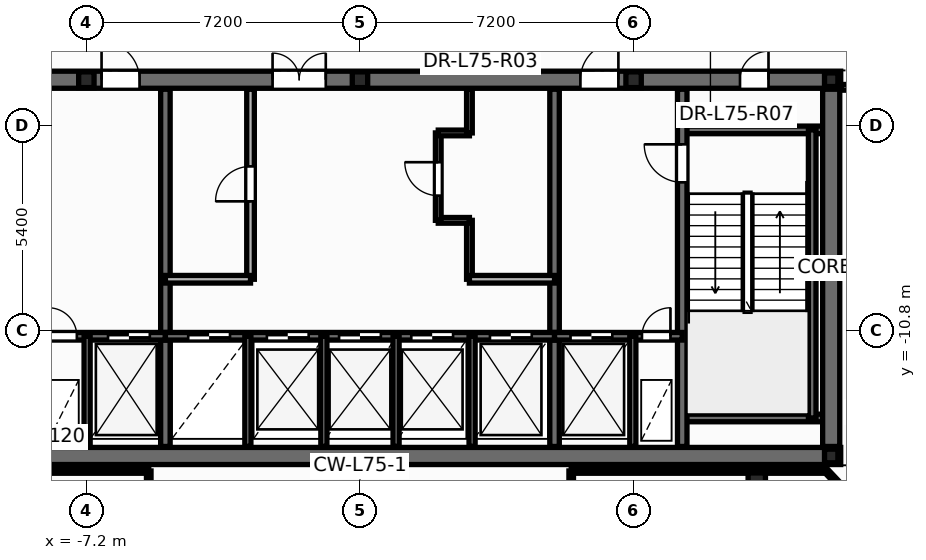
"""IFC4 building model, lengths in metres.
Left out: names, types, materials, properties, quantities, classifications, styles, units other than length and angle.
Written with IfcOpenShell. Run it as: python <this file> out.ifc"""

import sys

from ifc_helpers import new_model, si_unit, direction, frame, frame_2d, origin, origin_2d, place, context, subcontext, project, spatial, rectangle, hollow_circle, i_section, extrude, element, fill, save


model = new_model("IFC4")
c1 = context("Model", 3, precision=1e-05, world=origin(), true_north=direction((0.0, 1.0)))
c2 = subcontext(c1, "Body", "Model", "MODEL_VIEW")
j1 = project(units=[si_unit("LENGTHUNIT", "METRE"), si_unit("PLANEANGLEUNIT", "RADIAN")], contexts=[c1])
p1 = place(None, origin())
s1 = spatial("IfcSite", under=j1, at=p1, CompositionType="ELEMENT")
p2 = place(p1, origin())
s2 = spatial("IfcBuilding", under=s1, at=p2, CompositionType="ELEMENT")
p3 = place(p2, frame((0.0, 0.0, 285.0)))
s3 = spatial("IfcBuildingStorey", under=s2, at=p3, CompositionType="ELEMENT", Elevation=285.0)
p4 = place(p3, frame((10.442, -14.774, 0.0), z_axis=(0.0, 0.0, 1.0), x_axis=(1.0, 0.0, 0.0)))
e1 = element("IfcColumn", 1, at=p4, inside=s3, PredefinedType="COLUMN", context=c2, shape_type="SweptSolid", body=[
    extrude(hollow_circle(Radius=0.229, WallThickness=0.016, at=origin_2d()), origin(), (0.0, 0.0, 1.0), 4.2),
])
for number, where, z_axis, x_axis in (
    (2, (12.4, -14.1, 0.0), (0.0, 0.0, 1.0), (1.0, 0.0, 0.0)),
    (3, (12.4, -4.2, 0.0), (0.0, 0.0, 1.0), (1.0, 0.0, 0.0)),
):
    element("IfcColumn", number, at=place(p3, frame(where, z_axis=z_axis, x_axis=x_axis)), inside=s3, PredefinedType="COLUMN", context=c2, shape_type="SweptSolid", body=[
        extrude(i_section(OverallWidth=0.352, OverallDepth=0.359, WebThickness=0.018, FlangeThickness=0.026, at=origin_2d()), origin(), (0.0, 0.0, 1.0), 4.2),
    ])
for number, where, z_axis, x_axis in (
    (4, (-7.2, -4.2, 0.0), (0.0, 0.0, 1.0), (1.0, 0.0, 0.0)),
    (5, (0.0, -4.2, 0.0), (0.0, 0.0, 1.0), (1.0, 0.0, 0.0)),
    (6, (7.2, -4.2, 0.0), (0.0, 0.0, 1.0), (1.0, 0.0, 0.0)),
):
    element("IfcColumn", number, at=place(p3, frame(where, z_axis=z_axis, x_axis=x_axis)), inside=s3, PredefinedType="PILASTER", context=c2, shape_type="SweptSolid", body=[
        extrude(i_section(OverallWidth=0.405, OverallDepth=0.414, WebThickness=0.022, FlangeThickness=0.032, at=origin_2d()), origin(), (0.0, 0.0, 1.0), 4.2),
    ])
p5 = place(p3, frame((2.88, -9.45, 0.0), z_axis=(0.0, 0.0, 1.0), x_axis=(0.0, 1.0, 0.0)))
e7 = element("IfcWall", 7, at=p5, inside=s3, PredefinedType="PARTITIONING", context=c2, shape_type="SweptSolid", body=[
    extrude(rectangle(XDim=1.55, YDim=0.15, at=frame_2d((0.775, 0.0))), origin(), (0.0, 0.0, 1.0), 3.92),
])
p6 = place(p3, frame((2.06, -7.9, 0.0), z_axis=(0.0, 0.0, 1.0), x_axis=(1.0, 0.0, 0.0)))
e8 = element("IfcWall", 8, at=p6, inside=s3, PredefinedType="PARTITIONING", context=c2, shape_type="SweptSolid", body=[
    extrude(rectangle(XDim=0.82, YDim=0.15, at=frame_2d((0.41, 0.0))), origin(), (0.0, 0.0, 1.0), 3.92),
])
p7 = place(p3, frame((2.06, -7.9, 0.0), z_axis=(0.0, 0.0, 1.0), x_axis=(0.0, 1.0, 0.0)))
e9 = element("IfcWall", 9, at=p7, inside=s3, PredefinedType="PARTITIONING", context=c2, shape_type="SweptSolid", body=[
    extrude(rectangle(XDim=2.3, YDim=0.15, at=frame_2d((1.15, 0.0))), origin(), (0.0, 0.0, 1.0), 3.92),
])
p8 = place(p7, frame((0.65, 0.0, 0.0)))
e10 = element("IfcOpeningElement", 10, at=p8, cuts=e9, PredefinedType="OPENING", context=c2, shape_type="SweptSolid", body=[
    extrude(rectangle(XDim=0.886, YDim=2.104, at=frame_2d((0.44, 1.052))), frame((0.0, 0.085, 0.0), z_axis=(0.0, -1.0, 0.0), x_axis=(1.0, 0.0, 0.0)), (0.0, 0.0, 1.0), 0.17),
])
p9 = place(p3, frame((2.06, -5.6, 0.0), z_axis=(0.0, 0.0, 1.0), x_axis=(1.0, 0.0, 0.0)))
e11 = element("IfcWall", 11, at=p9, inside=s3, PredefinedType="PARTITIONING", context=c2, shape_type="SweptSolid", body=[
    extrude(rectangle(XDim=0.82, YDim=0.15, at=frame_2d((0.41, 0.0))), origin(), (0.0, 0.0, 1.0), 3.92),
])
p10 = place(p3, frame((2.88, -5.6, 0.0), z_axis=(0.0, 0.0, 1.0), x_axis=(0.0, 1.0, 0.0)))
e12 = element("IfcWall", 12, at=p10, inside=s3, PredefinedType="PARTITIONING", context=c2, shape_type="SweptSolid", body=[
    extrude(rectangle(XDim=1.15, YDim=0.15, at=frame_2d((0.575, 0.0))), origin(), (0.0, 0.0, 1.0), 3.92),
])
p11 = place(p3, frame((-12.65, -14.1, 0.0), z_axis=(0.0, 0.0, 1.0), x_axis=(1.0, 0.0, 0.0)))
e13 = element("IfcWall", 13, at=p11, inside=s3, PredefinedType="SHEAR", context=c2, shape_type="SweptSolid", body=[
    extrude(rectangle(XDim=25.3, YDim=0.45, at=frame_2d((12.65, 0.0))), origin(), (0.0, 0.0, 1.0), 4.2),
])
p12 = place(p3, frame((-12.65, -4.2, 0.0), z_axis=(0.0, 0.0, 1.0), x_axis=(1.0, 0.0, 0.0)))
e14 = element("IfcWall", 14, at=p12, inside=s3, PredefinedType="SHEAR", context=c2, shape_type="SweptSolid", body=[
    extrude(rectangle(XDim=25.3, YDim=0.45, at=frame_2d((12.65, 0.0))), origin(), (0.0, 0.0, 1.0), 4.2),
])
p13 = place(p12, frame((1.85, 0.0, 0.0)))
e15 = element("IfcOpeningElement", 15, at=p13, cuts=e14, PredefinedType="OPENING", context=c2, shape_type="SweptSolid", body=[
    extrude(rectangle(XDim=0.756, YDim=2.054, at=frame_2d((0.375, 1.027))), frame((0.0, 0.235, 0.0), z_axis=(0.0, -1.0, 0.0), x_axis=(1.0, 0.0, 0.0)), (0.0, 0.0, 1.0), 0.47),
])
p14 = place(p12, frame((22.65, 0.0, 0.0)))
e16 = element("IfcOpeningElement", 16, at=p14, cuts=e14, PredefinedType="OPENING", context=c2, shape_type="SweptSolid", body=[
    extrude(rectangle(XDim=0.756, YDim=2.054, at=frame_2d((0.375, 1.027))), frame((0.0, 0.235, 0.0), z_axis=(0.0, -1.0, 0.0), x_axis=(1.0, 0.0, 0.0)), (0.0, 0.0, 1.0), 0.47),
])
p15 = place(p12, frame((5.85, 0.0, 0.0)))
e17 = element("IfcOpeningElement", 17, at=p15, cuts=e14, PredefinedType="OPENING", context=c2, shape_type="SweptSolid", body=[
    extrude(rectangle(XDim=1.006, YDim=2.104, at=frame_2d((0.5, 1.052))), frame((0.0, 0.235, 0.0), z_axis=(0.0, -1.0, 0.0), x_axis=(1.0, 0.0, 0.0)), (0.0, 0.0, 1.0), 0.47),
])
p16 = place(p12, frame((10.35, 0.0, 0.0)))
e18 = element("IfcOpeningElement", 18, at=p16, cuts=e14, PredefinedType="OPENING", context=c2, shape_type="SweptSolid", body=[
    extrude(rectangle(XDim=1.406, YDim=2.154, at=frame_2d((0.7, 1.077))), frame((0.0, 0.235, 0.0), z_axis=(0.0, -1.0, 0.0), x_axis=(1.0, 0.0, 0.0)), (0.0, 0.0, 1.0), 0.47),
])
p17 = place(p12, frame((18.45, 0.0, 0.0)))
e19 = element("IfcOpeningElement", 19, at=p17, cuts=e14, PredefinedType="OPENING", context=c2, shape_type="SweptSolid", body=[
    extrude(rectangle(XDim=1.006, YDim=2.104, at=frame_2d((0.5, 1.052))), frame((0.0, 0.235, 0.0), z_axis=(0.0, -1.0, 0.0), x_axis=(1.0, 0.0, 0.0)), (0.0, 0.0, 1.0), 0.47),
])
for number, where, z_axis, x_axis in (
    (20, (8.48, -5.52, 0.0), (0.0, 0.0, 1.0), (1.0, 0.0, 0.0)),
    (21, (8.48, -13.1, 0.0), (0.0, 0.0, 1.0), (1.0, 0.0, 0.0)),
):
    element("IfcWall", number, at=place(p3, frame(where, z_axis=z_axis, x_axis=x_axis)), inside=s3, PredefinedType="SOLIDWALL", context=c2, shape_type="SweptSolid", body=[
        extrude(rectangle(XDim=3.87, YDim=0.2, at=frame_2d((1.935, 0.0))), origin(), (0.0, 0.0, 1.0), 4.2),
    ])
p18 = place(p3, frame((11.9, -13.1, 0.0), z_axis=(0.0, 0.0, 1.0), x_axis=(0.0, 1.0, 0.0)))
e22 = element("IfcWall", 22, at=p18, inside=s3, PredefinedType="SOLIDWALL", context=c2, shape_type="SweptSolid", body=[
    extrude(rectangle(XDim=7.58, YDim=0.2, at=frame_2d((3.79, 0.0))), origin(), (0.0, 0.0, 1.0), 4.2),
])
p19 = place(p3, frame((8.48, -13.85, 0.0), z_axis=(0.0, 0.0, 1.0), x_axis=(0.0, 1.0, 0.0)))
e23 = element("IfcWall", 23, at=p19, inside=s3, PredefinedType="SHEAR", context=c2, shape_type="SweptSolid", body=[
    extrude(rectangle(XDim=9.4, YDim=0.25, at=frame_2d((4.7, 0.0))), origin(), (0.0, 0.0, 1.0), 4.2),
])
p20 = place(p19, frame((6.95, 0.0, 0.0)))
e24 = element("IfcOpeningElement", 24, at=p20, cuts=e23, PredefinedType="OPENING", context=c2, shape_type="SweptSolid", body=[
    extrude(rectangle(XDim=1.006, YDim=2.104, at=frame_2d((0.5, 1.052))), frame((0.0, 0.135, 0.0), z_axis=(0.0, -1.0, 0.0), x_axis=(1.0, 0.0, 0.0)), (0.0, 0.0, 1.0), 0.27),
])
for number, where, z_axis, x_axis in (
    (25, (-5.12, -13.85, 0.0), (0.0, 0.0, 1.0), (0.0, 1.0, 0.0)),
    (26, (5.12, -13.85, 0.0), (0.0, 0.0, 1.0), (0.0, 1.0, 0.0)),
):
    element("IfcWall", number, at=place(p3, frame(where, z_axis=z_axis, x_axis=x_axis)), inside=s3, PredefinedType="SHEAR", context=c2, shape_type="SweptSolid", body=[
        extrude(rectangle(XDim=9.4, YDim=0.25, at=frame_2d((4.7, 0.0))), origin(), (0.0, 0.0, 1.0), 4.2),
    ])
p21 = place(p3, frame((-8.48, -10.95, 0.0), z_axis=(0.0, 0.0, 1.0), x_axis=(1.0, 0.0, 0.0)))
e27 = element("IfcWall", 27, at=p21, inside=s3, PredefinedType="SOLIDWALL", context=c2, shape_type="SweptSolid", body=[
    extrude(rectangle(XDim=3.36, YDim=0.2, at=frame_2d((1.68, 0.0))), origin(), (0.0, 0.0, 1.0), 4.2),
])
p22 = place(p21, frame((0.28, 0.0, 0.0)))
e28 = element("IfcOpeningElement", 28, at=p22, cuts=e27, PredefinedType="OPENING", context=c2, shape_type="SweptSolid", body=[
    extrude(rectangle(XDim=0.756, YDim=2.054, at=frame_2d((0.375, 1.027))), frame((0.0, 0.11, 0.0), z_axis=(0.0, -1.0, 0.0), x_axis=(1.0, 0.0, 0.0)), (0.0, 0.0, 1.0), 0.22),
])
p23 = place(p21, frame((1.85, 0.0, 0.0)))
e29 = element("IfcOpeningElement", 29, at=p23, cuts=e27, PredefinedType="OPENING", context=c2, shape_type="SweptSolid", body=[
    extrude(rectangle(XDim=1.106, YDim=2.104, at=frame_2d((0.55, 1.052))), frame((0.0, 0.11, 0.0), z_axis=(0.0, -1.0, 0.0), x_axis=(1.0, 0.0, 0.0)), (0.0, 0.0, 1.0), 0.22),
])
p24 = place(p3, frame((-5.12, -10.95, 0.0), z_axis=(0.0, 0.0, 1.0), x_axis=(1.0, 0.0, 0.0)))
e30 = element("IfcWall", 30, at=p24, inside=s3, PredefinedType="SOLIDWALL", context=c2, shape_type="SweptSolid", body=[
    extrude(rectangle(XDim=10.24, YDim=0.2, at=frame_2d((5.12, 0.0))), origin(), (0.0, 0.0, 1.0), 4.2),
])
p25 = place(p24, frame((0.6, 0.0, 0.0)))
e31 = element("IfcOpeningElement", 31, at=p25, cuts=e30, PredefinedType="OPENING", context=c2, shape_type="SweptSolid", body=[
    extrude(rectangle(XDim=1.106, YDim=2.104, at=frame_2d((0.55, 1.052))), frame((0.0, 0.11, 0.0), z_axis=(0.0, -1.0, 0.0), x_axis=(1.0, 0.0, 0.0)), (0.0, 0.0, 1.0), 0.22),
])
p26 = place(p24, frame((2.67, 0.0, 0.0)))
e32 = element("IfcOpeningElement", 32, at=p26, cuts=e30, PredefinedType="OPENING", context=c2, shape_type="SweptSolid", body=[
    extrude(rectangle(XDim=1.106, YDim=2.104, at=frame_2d((0.55, 1.052))), frame((0.0, 0.11, 0.0), z_axis=(0.0, -1.0, 0.0), x_axis=(1.0, 0.0, 0.0)), (0.0, 0.0, 1.0), 0.22),
])
p27 = place(p24, frame((4.57, 0.0, 0.0)))
e33 = element("IfcOpeningElement", 33, at=p27, cuts=e30, PredefinedType="OPENING", context=c2, shape_type="SweptSolid", body=[
    extrude(rectangle(XDim=1.106, YDim=2.104, at=frame_2d((0.55, 1.052))), frame((0.0, 0.11, 0.0), z_axis=(0.0, -1.0, 0.0), x_axis=(1.0, 0.0, 0.0)), (0.0, 0.0, 1.0), 0.22),
])
p28 = place(p24, frame((6.47, 0.0, 0.0)))
e34 = element("IfcOpeningElement", 34, at=p28, cuts=e30, PredefinedType="OPENING", context=c2, shape_type="SweptSolid", body=[
    extrude(rectangle(XDim=1.106, YDim=2.104, at=frame_2d((0.55, 1.052))), frame((0.0, 0.11, 0.0), z_axis=(0.0, -1.0, 0.0), x_axis=(1.0, 0.0, 0.0)), (0.0, 0.0, 1.0), 0.22),
])
p29 = place(p24, frame((8.54, 0.0, 0.0)))
e35 = element("IfcOpeningElement", 35, at=p29, cuts=e30, PredefinedType="OPENING", context=c2, shape_type="SweptSolid", body=[
    extrude(rectangle(XDim=1.106, YDim=2.104, at=frame_2d((0.55, 1.052))), frame((0.0, 0.11, 0.0), z_axis=(0.0, -1.0, 0.0), x_axis=(1.0, 0.0, 0.0)), (0.0, 0.0, 1.0), 0.22),
])
p30 = place(p3, frame((5.12, -10.95, 0.0), z_axis=(0.0, 0.0, 1.0), x_axis=(1.0, 0.0, 0.0)))
e36 = element("IfcWall", 36, at=p30, inside=s3, PredefinedType="SOLIDWALL", context=c2, shape_type="SweptSolid", body=[
    extrude(rectangle(XDim=3.36, YDim=0.2, at=frame_2d((1.68, 0.0))), origin(), (0.0, 0.0, 1.0), 4.2),
])
p31 = place(p30, frame((0.42, 0.0, 0.0)))
e37 = element("IfcOpeningElement", 37, at=p31, cuts=e36, PredefinedType="OPENING", context=c2, shape_type="SweptSolid", body=[
    extrude(rectangle(XDim=1.106, YDim=2.104, at=frame_2d((0.55, 1.052))), frame((0.0, 0.11, 0.0), z_axis=(0.0, -1.0, 0.0), x_axis=(1.0, 0.0, 0.0)), (0.0, 0.0, 1.0), 0.22),
])
p32 = place(p30, frame((2.3, 0.0, 0.0)))
e38 = element("IfcOpeningElement", 38, at=p32, cuts=e36, PredefinedType="OPENING", context=c2, shape_type="SweptSolid", body=[
    extrude(rectangle(XDim=0.756, YDim=2.054, at=frame_2d((0.375, 1.027))), frame((0.0, 0.11, 0.0), z_axis=(0.0, -1.0, 0.0), x_axis=(1.0, 0.0, 0.0)), (0.0, 0.0, 1.0), 0.22),
])
for number, where, z_axis, x_axis in (
    (39, (-7.18, -13.85, 0.0), (0.0, 0.0, 1.0), (0.0, 1.0, 0.0)),
    (40, (7.18, -13.85, 0.0), (0.0, 0.0, 1.0), (0.0, 1.0, 0.0)),
    (41, (-2.95, -13.85, 0.0), (0.0, 0.0, 1.0), (0.0, 1.0, 0.0)),
    (42, (2.95, -13.85, 0.0), (0.0, 0.0, 1.0), (0.0, 1.0, 0.0)),
):
    element("IfcWall", number, at=place(p3, frame(where, z_axis=z_axis, x_axis=x_axis)), inside=s3, PredefinedType="PARTITIONING", context=c2, shape_type="SweptSolid", body=[
        extrude(rectangle(XDim=2.9, YDim=0.16, at=frame_2d((1.45, 0.0))), origin(), (0.0, 0.0, 1.0), 3.145),
    ])
p33 = place(p3, frame((12.4, -13.85, 0.0), z_axis=(0.0, 0.0, 1.0), x_axis=(0.0, 1.0, 0.0)))
e43 = element("IfcWall", 43, at=p33, inside=s3, PredefinedType="SHEAR", context=c2, shape_type="SweptSolid", body=[
    extrude(rectangle(XDim=9.4, YDim=0.45, at=frame_2d((4.7, 0.0))), origin(), (0.0, 0.0, 1.0), 4.2),
])
p34 = place(p3, frame((-2.88, -9.45, 0.0), z_axis=(0.0, 0.0, 1.0), x_axis=(0.0, 1.0, 0.0)))
e44 = element("IfcWall", 44, at=p34, inside=s3, PredefinedType="SOLIDWALL", context=c2, shape_type="SweptSolid", body=[
    extrude(rectangle(XDim=5.0, YDim=0.2, at=frame_2d((2.5, 0.0))), origin(), (0.0, 0.0, 1.0), 3.92),
])
p35 = place(p34, frame((2.05, 0.0, 0.0)))
e45 = element("IfcOpeningElement", 45, at=p35, cuts=e44, PredefinedType="OPENING", context=c2, shape_type="SweptSolid", body=[
    extrude(rectangle(XDim=0.926, YDim=2.104, at=frame_2d((0.46, 1.052))), frame((0.0, 0.11, 0.0), z_axis=(0.0, -1.0, 0.0), x_axis=(1.0, 0.0, 0.0)), (0.0, 0.0, 1.0), 0.22),
])
for number, where, z_axis, x_axis in (
    (46, (-5.12, -9.45, 0.0), (0.0, 0.0, 1.0), (1.0, 0.0, 0.0)),
    (47, (2.88, -9.45, 0.0), (0.0, 0.0, 1.0), (1.0, 0.0, 0.0)),
):
    element("IfcWall", number, at=place(p3, frame(where, z_axis=z_axis, x_axis=x_axis)), inside=s3, PredefinedType="SOLIDWALL", context=c2, shape_type="SweptSolid", body=[
        extrude(rectangle(XDim=2.24, YDim=0.2, at=frame_2d((1.12, 0.0))), origin(), (0.0, 0.0, 1.0), 3.92),
    ])
for number, where, z_axis, x_axis in (
    (48, (-0.95, -13.85, 0.0), (0.0, 0.0, 1.0), (0.0, 1.0, 0.0)),
    (49, (0.95, -13.85, 0.0), (0.0, 0.0, 1.0), (0.0, 1.0, 0.0)),
):
    element("IfcWall", number, at=place(p3, frame(where, z_axis=z_axis, x_axis=x_axis)), inside=s3, PredefinedType="PARTITIONING", context=c2, shape_type="SweptSolid", body=[
        extrude(rectangle(XDim=2.9, YDim=0.16, at=frame_2d((1.45, 0.0))), origin(), (0.0, 0.0, 1.0), 3.145),
    ])
for number, where, z_axis, x_axis in (
    (50, (-12.27, -14.494, 0.0), (0.0, 0.0, 1.0), (1.0, 0.0, 0.0)),
    (51, (5.558, -14.494, 0.0), (0.0, 0.0, 1.0), (1.0, 0.0, 0.0)),
):
    element("IfcWall", number, at=place(p3, frame(where, z_axis=z_axis, x_axis=x_axis)), inside=s3, PredefinedType="PARTITIONING", context=c2, shape_type="SweptSolid", body=[
        extrude(rectangle(XDim=6.711, YDim=0.12, at=frame_2d((3.356, 0.0))), origin(), (0.0, 0.0, 1.0), 3.438),
    ])
p36 = place(p3, frame((12.652, -4.4, 0.0), z_axis=(0.0, 0.0, 1.0), x_axis=(1.0, 0.0, 0.0)))
e52 = element("IfcWall", 52, at=p36, inside=s3, PredefinedType="PARTITIONING", context=c2, shape_type="SweptSolid", body=[
    extrude(rectangle(XDim=2.602, YDim=0.15, at=frame_2d((1.301, 0.0))), origin(), (0.0, 0.0, 1.0), 2.895),
])
p37 = place(p36, frame((1.528, 0.0, 0.0)))
e53 = element("IfcOpeningElement", 53, at=p37, cuts=e52, PredefinedType="OPENING", context=c2, shape_type="SweptSolid", body=[
    extrude(rectangle(XDim=0.906, YDim=2.104, at=frame_2d((0.45, 1.052))), frame((0.0, 0.085, 0.0), z_axis=(0.0, -1.0, 0.0), x_axis=(1.0, 0.0, 0.0)), (0.0, 0.0, 1.0), 0.17),
])
p38 = place(p3, frame((12.27, -14.494, 0.0), z_axis=(0.0, 0.0, 1.0), x_axis=(0.685203170989, -0.728351985283, 0.0)))
e54 = element("IfcWall", 54, at=p38, inside=s3, PredefinedType="PARTITIONING", context=c2, shape_type="SweptSolid", body=[
    extrude(rectangle(XDim=0.849, YDim=0.12, at=frame_2d((0.424, 0.0))), origin(), (0.0, 0.0, 1.0), 3.438),
])
for number, where, z_axis, x_axis in (
    (55, (-5.558, -14.494, 0.0), (0.0, 0.0, 1.0), (0.0, -1.0, 0.0)),
    (56, (5.558, -15.164, 0.0), (0.0, 0.0, 1.0), (0.0, 1.0, 0.0)),
):
    element("IfcWall", number, at=place(p3, frame(where, z_axis=z_axis, x_axis=x_axis)), inside=s3, PredefinedType="PARTITIONING", context=c2, shape_type="SweptSolid", body=[
        extrude(rectangle(XDim=0.67, YDim=0.12, at=frame_2d((0.335, 0.0))), origin(), (0.0, 0.0, 1.0), 3.438),
    ])
p39 = place(p35, origin())
e57 = element("IfcDoor", 57, at=p39, inside=s3, OperationType="SINGLE_SWING_LEFT", PredefinedType="DOOR", context=c2, shape_type="SweptSolid", body=[
    extrude(rectangle(XDim=0.92, YDim=2.1, at=frame_2d((0.46, 1.05))), frame((0.0, 0.025, 0.0), z_axis=(0.0, -1.0, 0.0), x_axis=(1.0, 0.0, 0.0)), (0.0, 0.0, 1.0), 0.05),
])
fill(e45, e57)
p40 = place(p8, origin())
e58 = element("IfcDoor", 58, at=p40, inside=s3, OperationType="SINGLE_SWING_RIGHT", PredefinedType="DOOR", context=c2, shape_type="SweptSolid", body=[
    extrude(rectangle(XDim=0.88, YDim=2.1, at=frame_2d((0.44, 1.05))), frame((0.0, 0.025, 0.0), z_axis=(0.0, -1.0, 0.0), x_axis=(1.0, 0.0, 0.0)), (0.0, 0.0, 1.0), 0.05),
])
fill(e10, e58)
p41 = place(p20, origin())
e59 = element("IfcDoor", 59, at=p41, inside=s3, OperationType="SINGLE_SWING_RIGHT", PredefinedType="DOOR", context=c2, shape_type="SweptSolid", body=[
    extrude(rectangle(XDim=1.0, YDim=2.1, at=frame_2d((0.5, 1.05))), frame((0.0, 0.025, 0.0), z_axis=(0.0, -1.0, 0.0), x_axis=(1.0, 0.0, 0.0)), (0.0, 0.0, 1.0), 0.05),
])
fill(e24, e59)
p42 = place(p22, origin())
e60 = element("IfcDoor", 60, at=p42, inside=s3, OperationType="SINGLE_SWING_LEFT", PredefinedType="DOOR", context=c2, shape_type="SweptSolid", body=[
    extrude(rectangle(XDim=0.75, YDim=2.05, at=frame_2d((0.375, 1.025))), frame((0.0, 0.025, 0.0), z_axis=(0.0, -1.0, 0.0), x_axis=(1.0, 0.0, 0.0)), (0.0, 0.0, 1.0), 0.05),
])
fill(e28, e60)
p43 = place(p23, origin())
e61 = element("IfcDoor", 61, at=p43, inside=s3, OperationType="DOUBLE_DOOR_SLIDING", PredefinedType="DOOR", context=c2, shape_type="SweptSolid", body=[
    extrude(rectangle(XDim=1.1, YDim=2.1, at=frame_2d((0.55, 1.05))), frame((0.0, 0.025, 0.0), z_axis=(0.0, -1.0, 0.0), x_axis=(1.0, 0.0, 0.0)), (0.0, 0.0, 1.0), 0.05),
])
fill(e29, e61)
p44 = place(p31, origin())
e62 = element("IfcDoor", 62, at=p44, inside=s3, OperationType="DOUBLE_DOOR_SLIDING", PredefinedType="DOOR", context=c2, shape_type="SweptSolid", body=[
    extrude(rectangle(XDim=1.1, YDim=2.1, at=frame_2d((0.55, 1.05))), frame((0.0, 0.025, 0.0), z_axis=(0.0, -1.0, 0.0), x_axis=(1.0, 0.0, 0.0)), (0.0, 0.0, 1.0), 0.05),
])
fill(e37, e62)
p45 = place(p32, origin())
e63 = element("IfcDoor", 63, at=p45, inside=s3, OperationType="SINGLE_SWING_RIGHT", PredefinedType="DOOR", context=c2, shape_type="SweptSolid", body=[
    extrude(rectangle(XDim=0.75, YDim=2.05, at=frame_2d((0.375, 1.025))), frame((0.0, 0.025, 0.0), z_axis=(0.0, -1.0, 0.0), x_axis=(1.0, 0.0, 0.0)), (0.0, 0.0, 1.0), 0.05),
])
fill(e38, e63)
p46 = place(p25, origin())
e64 = element("IfcDoor", 64, at=p46, inside=s3, OperationType="DOUBLE_DOOR_SLIDING", PredefinedType="DOOR", context=c2, shape_type="SweptSolid", body=[
    extrude(rectangle(XDim=1.1, YDim=2.1, at=frame_2d((0.55, 1.05))), frame((0.0, 0.025, 0.0), z_axis=(0.0, -1.0, 0.0), x_axis=(1.0, 0.0, 0.0)), (0.0, 0.0, 1.0), 0.05),
])
fill(e31, e64)
p47 = place(p26, origin())
e65 = element("IfcDoor", 65, at=p47, inside=s3, OperationType="DOUBLE_DOOR_SLIDING", PredefinedType="DOOR", context=c2, shape_type="SweptSolid", body=[
    extrude(rectangle(XDim=1.1, YDim=2.1, at=frame_2d((0.55, 1.05))), frame((0.0, 0.025, 0.0), z_axis=(0.0, -1.0, 0.0), x_axis=(1.0, 0.0, 0.0)), (0.0, 0.0, 1.0), 0.05),
])
fill(e32, e65)
p48 = place(p27, origin())
e66 = element("IfcDoor", 66, at=p48, inside=s3, OperationType="DOUBLE_DOOR_SLIDING", PredefinedType="DOOR", context=c2, shape_type="SweptSolid", body=[
    extrude(rectangle(XDim=1.1, YDim=2.1, at=frame_2d((0.55, 1.05))), frame((0.0, 0.025, 0.0), z_axis=(0.0, -1.0, 0.0), x_axis=(1.0, 0.0, 0.0)), (0.0, 0.0, 1.0), 0.05),
])
fill(e33, e66)
p49 = place(p28, origin())
e67 = element("IfcDoor", 67, at=p49, inside=s3, OperationType="DOUBLE_DOOR_SLIDING", PredefinedType="DOOR", context=c2, shape_type="SweptSolid", body=[
    extrude(rectangle(XDim=1.1, YDim=2.1, at=frame_2d((0.55, 1.05))), frame((0.0, 0.025, 0.0), z_axis=(0.0, -1.0, 0.0), x_axis=(1.0, 0.0, 0.0)), (0.0, 0.0, 1.0), 0.05),
])
fill(e34, e67)
p50 = place(p29, origin())
e68 = element("IfcDoor", 68, at=p50, inside=s3, OperationType="DOUBLE_DOOR_SLIDING", PredefinedType="DOOR", context=c2, shape_type="SweptSolid", body=[
    extrude(rectangle(XDim=1.1, YDim=2.1, at=frame_2d((0.55, 1.05))), frame((0.0, 0.025, 0.0), z_axis=(0.0, -1.0, 0.0), x_axis=(1.0, 0.0, 0.0)), (0.0, 0.0, 1.0), 0.05),
])
fill(e35, e68)
p51 = place(p14, origin())
e69 = element("IfcDoor", 69, at=p51, inside=s3, OperationType="SINGLE_SWING_RIGHT", PredefinedType="DOOR", context=c2, shape_type="SweptSolid", body=[
    extrude(rectangle(XDim=0.75, YDim=2.05, at=frame_2d((0.375, 1.025))), frame((0.0, 0.025, 0.0), z_axis=(0.0, -1.0, 0.0), x_axis=(1.0, 0.0, 0.0)), (0.0, 0.0, 1.0), 0.05),
])
fill(e16, e69)
p52 = place(p15, origin())
e70 = element("IfcDoor", 70, at=p52, inside=s3, OperationType="SINGLE_SWING_LEFT", PredefinedType="DOOR", context=c2, shape_type="SweptSolid", body=[
    extrude(rectangle(XDim=1.0, YDim=2.1, at=frame_2d((0.5, 1.05))), frame((0.0, 0.025, 0.0), z_axis=(0.0, -1.0, 0.0), x_axis=(1.0, 0.0, 0.0)), (0.0, 0.0, 1.0), 0.05),
])
fill(e17, e70)
p53 = place(p16, origin())
e71 = element("IfcDoor", 71, at=p53, inside=s3, OperationType="DOUBLE_DOOR_SINGLE_SWING", PredefinedType="DOOR", context=c2, shape_type="SweptSolid", body=[
    extrude(rectangle(XDim=1.4, YDim=2.15, at=frame_2d((0.7, 1.075))), frame((0.0, 0.025, 0.0), z_axis=(0.0, -1.0, 0.0), x_axis=(1.0, 0.0, 0.0)), (0.0, 0.0, 1.0), 0.05),
])
fill(e18, e71)
p54 = place(p17, origin())
e72 = element("IfcDoor", 72, at=p54, inside=s3, OperationType="SINGLE_SWING_RIGHT", PredefinedType="DOOR", context=c2, shape_type="SweptSolid", body=[
    extrude(rectangle(XDim=1.0, YDim=2.1, at=frame_2d((0.5, 1.05))), frame((0.0, 0.025, 0.0), z_axis=(0.0, -1.0, 0.0), x_axis=(1.0, 0.0, 0.0)), (0.0, 0.0, 1.0), 0.05),
])
fill(e19, e72)
save(model, sys.argv[1])
